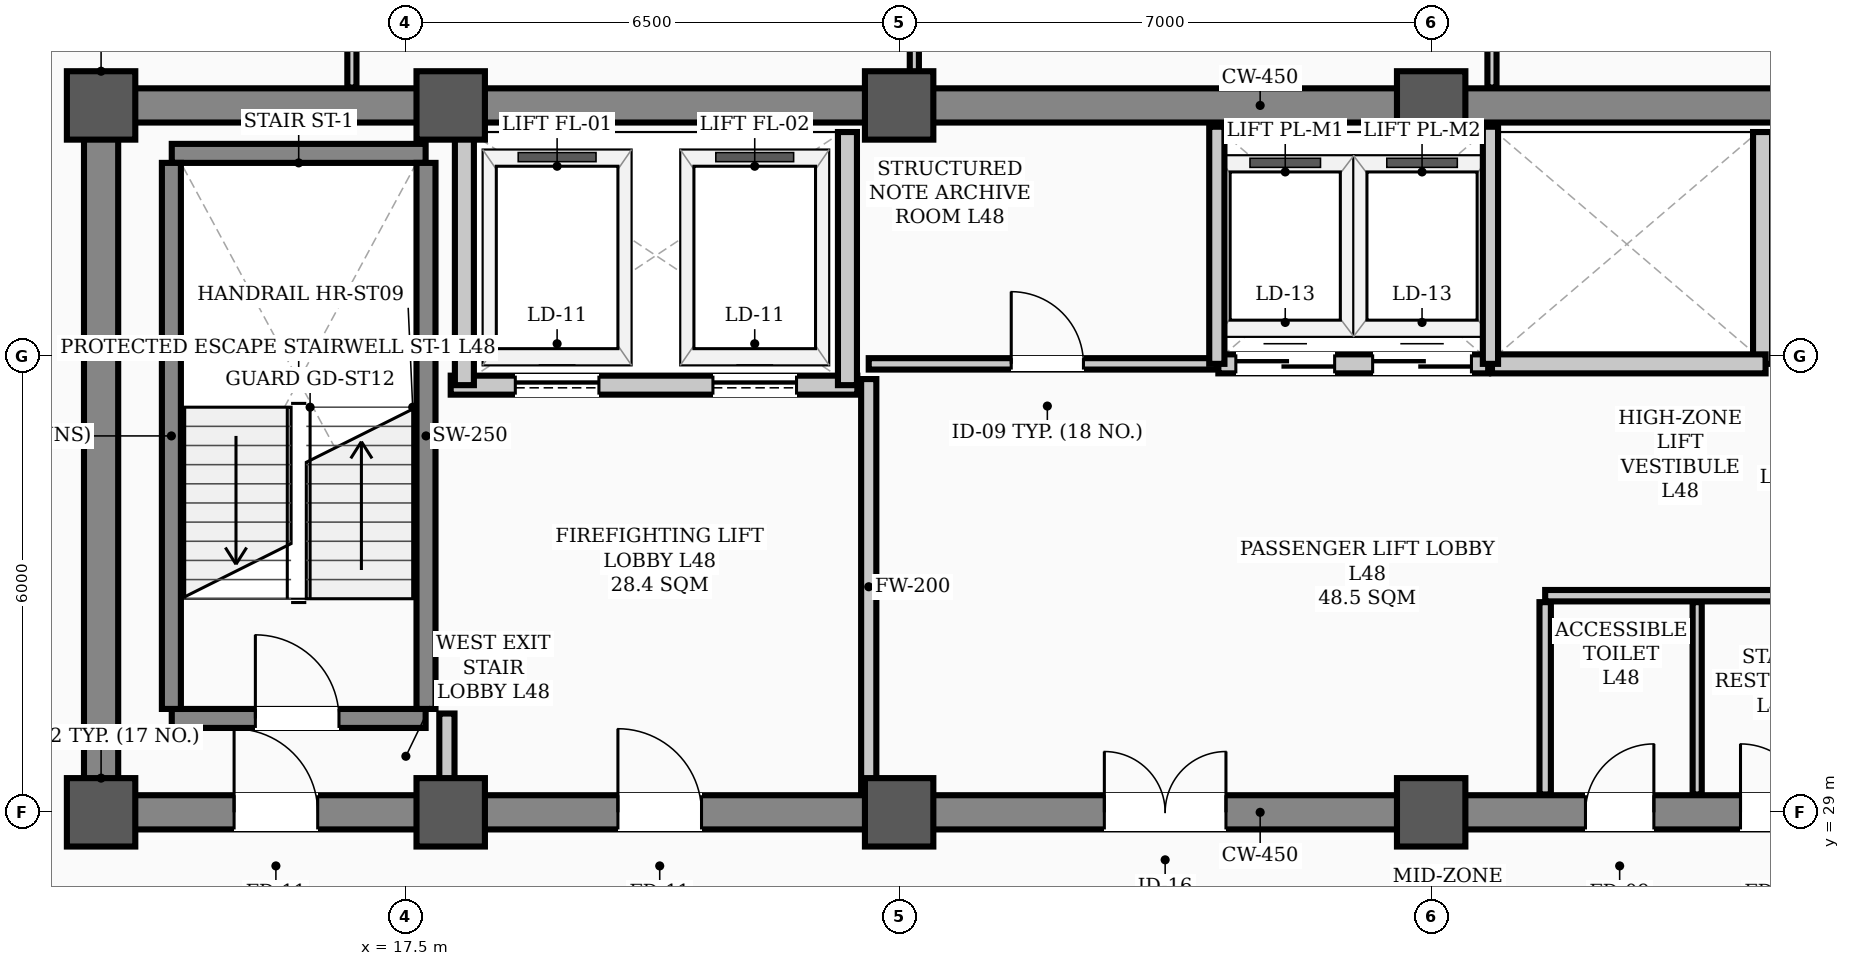
"""IFC4 building model, lengths in metres.
Left out: names, types, materials, properties, quantities, classifications, styles, units other than length and angle.
Written with IfcOpenShell. Run it as: python <this file> out.ifc"""

import sys

from ifc_helpers import new_model, si_unit, direction, frame, frame_2d, origin, origin_2d, place, context, subcontext, project, spatial, rectangle, hollow_rectangle, extrude, element, fill, save


model = new_model("IFC4")
c1 = context("Model", 3, precision=1e-05, world=origin(), true_north=direction((0.0, 1.0)))
c2 = subcontext(c1, "Body", "Model", "MODEL_VIEW")
j1 = project(units=[si_unit("LENGTHUNIT", "METRE"), si_unit("PLANEANGLEUNIT", "RADIAN")], contexts=[c1])
p1 = place(None, origin())
s1 = spatial("IfcSite", under=j1, at=p1, CompositionType="ELEMENT")
p2 = place(p1, origin())
s2 = spatial("IfcBuilding", under=s1, at=p2, CompositionType="ELEMENT")
p3 = place(p2, frame((0.0, 0.0, 192.9)))
s3 = spatial("IfcBuildingStorey", under=s2, at=p3, CompositionType="ELEMENT", Elevation=192.9)
for number, where, z_axis, x_axis in (
    (1, (13.5, 29.0, 0.0), (0.0, 0.0, 1.0), (1.0, 0.0, 0.0)),
    (2, (13.5, 38.3, 0.0), (0.0, 0.0, 1.0), (1.0, 0.0, 0.0)),
    (3, (18.1, 29.0, 0.0), (0.0, 0.0, 1.0), (1.0, 0.0, 0.0)),
    (4, (18.1, 38.3, 0.0), (0.0, 0.0, 1.0), (1.0, 0.0, 0.0)),
    (5, (24.0, 29.0, 0.0), (0.0, 0.0, 1.0), (1.0, 0.0, 0.0)),
    (6, (24.0, 38.3, 0.0), (0.0, 0.0, 1.0), (1.0, 0.0, 0.0)),
    (7, (31.0, 29.0, 0.0), (0.0, 0.0, 1.0), (1.0, 0.0, 0.0)),
    (8, (31.0, 38.3, 0.0), (0.0, 0.0, 1.0), (1.0, 0.0, 0.0)),
):
    element("IfcColumn", number, at=place(p3, frame(where, z_axis=z_axis, x_axis=x_axis)), inside=s3, PredefinedType="COLUMN", context=c2, shape_type="SweptSolid", body=[
        extrude(hollow_rectangle(XDim=0.9, YDim=0.9, WallThickness=0.035, InnerFilletRadius=0.017, OuterFilletRadius=0.052, at=origin_2d()), origin(), (0.0, 0.0, 1.0), 3.9),
    ])
p4 = place(p3, frame((13.5, 29.0, 0.0), z_axis=(0.0, 0.0, 1.0), x_axis=(1.0, 0.0, 0.0)))
e9 = element("IfcWall", 9, at=p4, inside=s3, PredefinedType="SHEAR", context=c2, shape_type="SweptSolid", body=[
    extrude(rectangle(XDim=30.5, YDim=0.45, at=frame_2d((15.25, 0.0))), origin(), (0.0, 0.0, 1.0), 3.66),
])
p5 = place(p4, frame((1.75, 0.0, 0.0)))
e10 = element("IfcOpeningElement", 10, at=p5, cuts=e9, PredefinedType="OPENING", context=c2, shape_type="SweptSolid", body=[
    extrude(rectangle(XDim=1.1, YDim=2.08, at=frame_2d((0.55, 1.04))), frame((0.0, 0.235, 0.0), z_axis=(0.0, -1.0, 0.0), x_axis=(1.0, 0.0, 0.0)), (0.0, 0.0, 1.0), 0.47),
])
p6 = place(p4, frame((26.7, 0.0, 0.0)))
e11 = element("IfcOpeningElement", 11, at=p6, cuts=e9, PredefinedType="OPENING", context=c2, shape_type="SweptSolid", body=[
    extrude(rectangle(XDim=1.1, YDim=2.08, at=frame_2d((0.55, 1.04))), frame((0.0, 0.235, 0.0), z_axis=(0.0, -1.0, 0.0), x_axis=(1.0, 0.0, 0.0)), (0.0, 0.0, 1.0), 0.47),
])
p7 = place(p4, frame((6.8, 0.0, 0.0)))
e12 = element("IfcOpeningElement", 12, at=p7, cuts=e9, PredefinedType="OPENING", context=c2, shape_type="SweptSolid", body=[
    extrude(rectangle(XDim=1.1, YDim=2.08, at=frame_2d((0.55, 1.04))), frame((0.0, 0.235, 0.0), z_axis=(0.0, -1.0, 0.0), x_axis=(1.0, 0.0, 0.0)), (0.0, 0.0, 1.0), 0.47),
])
p8 = place(p4, frame((13.2, 0.0, 0.0)))
e13 = element("IfcOpeningElement", 13, at=p8, cuts=e9, PredefinedType="OPENING", context=c2, shape_type="SweptSolid", body=[
    extrude(rectangle(XDim=1.6, YDim=2.08, at=frame_2d((0.8, 1.04))), frame((0.0, 0.235, 0.0), z_axis=(0.0, -1.0, 0.0), x_axis=(1.0, 0.0, 0.0)), (0.0, 0.0, 1.0), 0.47),
])
p9 = place(p4, frame((19.53, 0.0, 0.0)))
e14 = element("IfcOpeningElement", 14, at=p9, cuts=e9, PredefinedType="OPENING", context=c2, shape_type="SweptSolid", body=[
    extrude(rectangle(XDim=0.9, YDim=2.08, at=frame_2d((0.45, 1.04))), frame((0.0, 0.235, 0.0), z_axis=(0.0, -1.0, 0.0), x_axis=(1.0, 0.0, 0.0)), (0.0, 0.0, 1.0), 0.47),
])
p10 = place(p4, frame((21.57, 0.0, 0.0)))
e15 = element("IfcOpeningElement", 15, at=p10, cuts=e9, PredefinedType="OPENING", context=c2, shape_type="SweptSolid", body=[
    extrude(rectangle(XDim=0.9, YDim=2.08, at=frame_2d((0.45, 1.04))), frame((0.0, 0.235, 0.0), z_axis=(0.0, -1.0, 0.0), x_axis=(1.0, 0.0, 0.0)), (0.0, 0.0, 1.0), 0.47),
])
p11 = place(p3, frame((13.5, 38.3, 0.0), z_axis=(0.0, 0.0, 1.0), x_axis=(1.0, 0.0, 0.0)))
e16 = element("IfcWall", 16, at=p11, inside=s3, PredefinedType="SHEAR", context=c2, shape_type="SweptSolid", body=[
    extrude(rectangle(XDim=30.5, YDim=0.45, at=frame_2d((15.25, 0.0))), origin(), (0.0, 0.0, 1.0), 3.66),
])
p12 = place(p3, frame((13.5, 29.35, 0.0), z_axis=(0.0, 0.0, 1.0), x_axis=(0.0, 1.0, 0.0)))
e17 = element("IfcWall", 17, at=p12, inside=s3, PredefinedType="SHEAR", context=c2, shape_type="SweptSolid", body=[
    extrude(rectangle(XDim=8.6, YDim=0.45, at=frame_2d((4.3, 0.0))), origin(), (0.0, 0.0, 1.0), 3.66),
])
p13 = place(p3, frame((14.43, 30.235, 0.0), z_axis=(0.0, 0.0, 1.0), x_axis=(1.0, 0.0, 0.0)))
e18 = element("IfcWall", 18, at=p13, inside=s3, PredefinedType="STANDARD", context=c2, shape_type="SweptSolid", body=[
    extrude(rectangle(XDim=3.34, YDim=0.25, at=frame_2d((1.67, 0.0))), origin(), (0.0, 0.0, 1.0), 3.66),
])
p14 = place(p13, frame((1.1, 0.0, 0.0)))
e19 = element("IfcOpeningElement", 19, at=p14, cuts=e18, PredefinedType="OPENING", context=c2, shape_type="SweptSolid", body=[
    extrude(rectangle(XDim=1.1, YDim=2.08, at=frame_2d((0.55, 1.04))), frame((0.0, 0.135, 0.0), z_axis=(0.0, -1.0, 0.0), x_axis=(1.0, 0.0, 0.0)), (0.0, 0.0, 1.0), 0.27),
])
p15 = place(p3, frame((14.43, 37.669, 0.0), z_axis=(0.0, 0.0, 1.0), x_axis=(1.0, 0.0, 0.0)))
e20 = element("IfcWall", 20, at=p15, inside=s3, PredefinedType="STANDARD", context=c2, shape_type="SweptSolid", body=[
    extrude(rectangle(XDim=3.34, YDim=0.25, at=frame_2d((1.67, 0.0))), origin(), (0.0, 0.0, 1.0), 3.66),
])
for number, where, z_axis, x_axis in (
    (21, (14.425, 30.36, 0.0), (0.0, 0.0, 1.0), (0.0, 1.0, 0.0)),
    (22, (17.775, 30.36, 0.0), (0.0, 0.0, 1.0), (0.0, 1.0, 0.0)),
):
    element("IfcWall", number, at=place(p3, frame(where, z_axis=z_axis, x_axis=x_axis)), inside=s3, PredefinedType="STANDARD", context=c2, shape_type="SweptSolid", body=[
        extrude(rectangle(XDim=7.184, YDim=0.25, at=frame_2d((3.592, 0.0))), origin(), (0.0, 0.0, 1.0), 3.66),
    ])
p16 = place(p3, frame((18.1, 34.62, 0.0), z_axis=(0.0, 0.0, 1.0), x_axis=(1.0, 0.0, 0.0)))
e23 = element("IfcWall", 23, at=p16, inside=s3, PredefinedType="STANDARD", context=c2, shape_type="SweptSolid", body=[
    extrude(rectangle(XDim=5.35, YDim=0.25, at=frame_2d((2.675, 0.0))), origin(), (0.0, 0.0, 1.0), 3.66),
])
p17 = place(p16, frame((0.85, 0.0, 0.0)))
e24 = element("IfcOpeningElement", 24, at=p17, cuts=e23, PredefinedType="OPENING", context=c2, shape_type="SweptSolid", body=[
    extrude(rectangle(XDim=1.1, YDim=2.08, at=frame_2d((0.55, 1.04))), frame((0.0, 0.135, 0.0), z_axis=(0.0, -1.0, 0.0), x_axis=(1.0, 0.0, 0.0)), (0.0, 0.0, 1.0), 0.27),
])
p18 = place(p16, frame((3.45, 0.0, 0.0)))
e25 = element("IfcOpeningElement", 25, at=p18, cuts=e23, PredefinedType="OPENING", context=c2, shape_type="SweptSolid", body=[
    extrude(rectangle(XDim=1.1, YDim=2.08, at=frame_2d((0.55, 1.04))), frame((0.0, 0.135, 0.0), z_axis=(0.0, -1.0, 0.0), x_axis=(1.0, 0.0, 0.0)), (0.0, 0.0, 1.0), 0.27),
])
for number, where, z_axis, x_axis in (
    (26, (18.28, 34.62, 0.0), (0.0, 0.0, 1.0), (0.0, 1.0, 0.0)),
    (27, (23.32, 34.62, 0.0), (0.0, 0.0, 1.0), (0.0, 1.0, 0.0)),
):
    element("IfcWall", number, at=place(p3, frame(where, z_axis=z_axis, x_axis=x_axis)), inside=s3, PredefinedType="STANDARD", context=c2, shape_type="SweptSolid", body=[
        extrude(rectangle(XDim=3.33, YDim=0.25, at=frame_2d((1.665, 0.0))), origin(), (0.0, 0.0, 1.0), 2.24),
    ])
p19 = place(p3, frame((35.36, 34.9, 0.0), z_axis=(0.0, 0.0, 1.0), x_axis=(0.0, 1.0, 0.0)))
e28 = element("IfcWall", 28, at=p19, inside=s3, PredefinedType="STANDARD", context=c2, shape_type="SweptSolid", body=[
    extrude(rectangle(XDim=3.05, YDim=0.25, at=frame_2d((1.525, 0.0))), origin(), (0.0, 0.0, 1.0), 2.24),
])
p20 = place(p3, frame((28.2, 34.9, 0.0), z_axis=(0.0, 0.0, 1.0), x_axis=(1.0, 0.0, 0.0)))
e29 = element("IfcWall", 29, at=p20, inside=s3, PredefinedType="STANDARD", context=c2, shape_type="SweptSolid", body=[
    extrude(rectangle(XDim=3.55, YDim=0.25, at=frame_2d((1.775, 0.0))), origin(), (0.0, 0.0, 1.0), 3.66),
])
p21 = place(p20, frame((0.23, 0.0, 0.0)))
e30 = element("IfcOpeningElement", 30, at=p21, cuts=e29, PredefinedType="OPENING", context=c2, shape_type="SweptSolid", body=[
    extrude(rectangle(XDim=1.3, YDim=2.08, at=frame_2d((0.65, 1.04))), frame((0.0, 0.135, 0.0), z_axis=(0.0, -1.0, 0.0), x_axis=(1.0, 0.0, 0.0)), (0.0, 0.0, 1.0), 0.27),
])
p22 = place(p20, frame((2.03, 0.0, 0.0)))
e31 = element("IfcOpeningElement", 31, at=p22, cuts=e29, PredefinedType="OPENING", context=c2, shape_type="SweptSolid", body=[
    extrude(rectangle(XDim=1.3, YDim=2.08, at=frame_2d((0.65, 1.04))), frame((0.0, 0.135, 0.0), z_axis=(0.0, -1.0, 0.0), x_axis=(1.0, 0.0, 0.0)), (0.0, 0.0, 1.0), 0.27),
])
p23 = place(p3, frame((31.8, 34.9, 0.0), z_axis=(0.0, 0.0, 1.0), x_axis=(1.0, 0.0, 0.0)))
e32 = element("IfcWall", 32, at=p23, inside=s3, PredefinedType="STANDARD", context=c2, shape_type="SweptSolid", body=[
    extrude(rectangle(XDim=3.6, YDim=0.25, at=frame_2d((1.8, 0.0))), origin(), (0.0, 0.0, 1.0), 3.66),
])
p24 = place(p3, frame((23.6, 34.9, 0.0), z_axis=(0.0, 0.0, 1.0), x_axis=(1.0, 0.0, 0.0)))
e33 = element("IfcWall", 33, at=p24, inside=s3, PredefinedType="PARTITIONING", context=c2, shape_type="SweptSolid", body=[
    extrude(rectangle(XDim=4.58, YDim=0.15, at=frame_2d((2.29, 0.0))), origin(), (0.0, 0.0, 1.0), 3.66),
])
p25 = place(p24, frame((1.875, 0.0, 0.0)))
e34 = element("IfcOpeningElement", 34, at=p25, cuts=e33, PredefinedType="OPENING", context=c2, shape_type="SweptSolid", body=[
    extrude(rectangle(XDim=0.95, YDim=2.08, at=frame_2d((0.475, 1.04))), frame((0.0, 0.085, 0.0), z_axis=(0.0, -1.0, 0.0), x_axis=(1.0, 0.0, 0.0)), (0.0, 0.0, 1.0), 0.17),
])
p26 = place(p3, frame((32.5, 31.85, 0.0), z_axis=(0.0, 0.0, 1.0), x_axis=(1.0, 0.0, 0.0)))
e35 = element("IfcWall", 35, at=p26, inside=s3, PredefinedType="PARTITIONING", context=c2, shape_type="SweptSolid", body=[
    extrude(rectangle(XDim=4.1, YDim=0.15, at=frame_2d((2.05, 0.0))), origin(), (0.0, 0.0, 1.0), 3.66),
])
p27 = place(p3, frame((18.05, 29.235, 0.0), z_axis=(0.0, 0.0, 1.0), x_axis=(0.0, 1.0, 0.0)))
e36 = element("IfcWall", 36, at=p27, inside=s3, PredefinedType="STANDARD", context=c2, shape_type="SweptSolid", body=[
    extrude(rectangle(XDim=1.065, YDim=0.2, at=frame_2d((0.532, 0.0))), origin(), (0.0, 0.0, 1.0), 2.24),
])
p28 = place(p3, frame((23.6, 29.235, 0.0), z_axis=(0.0, 0.0, 1.0), x_axis=(0.0, 1.0, 0.0)))
e37 = element("IfcWall", 37, at=p28, inside=s3, PredefinedType="STANDARD", context=c2, shape_type="SweptSolid", body=[
    extrude(rectangle(XDim=5.465, YDim=0.2, at=frame_2d((2.732, 0.0))), origin(), (0.0, 0.0, 1.0), 2.24),
])
p29 = place(p3, frame((32.5, 29.235, 0.0), z_axis=(0.0, 0.0, 1.0), x_axis=(0.0, 1.0, 0.0)))
e38 = element("IfcWall", 38, at=p29, inside=s3, PredefinedType="PARTITIONING", context=c2, shape_type="SweptSolid", body=[
    extrude(rectangle(XDim=2.53, YDim=0.15, at=frame_2d((1.265, 0.0))), origin(), (0.0, 0.0, 1.0), 2.24),
])
p30 = place(p3, frame((34.5, 29.235, 0.0), z_axis=(0.0, 0.0, 1.0), x_axis=(0.0, 1.0, 0.0)))
e39 = element("IfcWall", 39, at=p30, inside=s3, PredefinedType="PARTITIONING", context=c2, shape_type="SweptSolid", body=[
    extrude(rectangle(XDim=2.53, YDim=0.12, at=frame_2d((1.265, 0.0))), origin(), (0.0, 0.0, 1.0), 2.24),
])
p31 = place(p3, frame((16.8, 38.535, 0.0), z_axis=(0.0, 0.0, 1.0), x_axis=(0.0, 1.0, 0.0)))
e40 = element("IfcWall", 40, at=p31, inside=s3, PredefinedType="PARTITIONING", context=c2, shape_type="SweptSolid", body=[
    extrude(rectangle(XDim=6.405, YDim=0.12, at=frame_2d((3.203, 0.0))), origin(), (0.0, 0.0, 1.0), 2.24),
])
p32 = place(p31, frame((3.485, 0.0, 0.0)))
e41 = element("IfcOpeningElement", 41, at=p32, cuts=e40, PredefinedType="OPENING", context=c2, shape_type="SweptSolid", body=[
    extrude(rectangle(XDim=0.95, YDim=2.08, at=frame_2d((0.475, 1.04))), frame((0.0, 0.07, 0.0), z_axis=(0.0, -1.0, 0.0), x_axis=(1.0, 0.0, 0.0)), (0.0, 0.0, 1.0), 0.14),
])
p33 = place(p3, frame((24.2, 38.535, 0.0), z_axis=(0.0, 0.0, 1.0), x_axis=(0.0, 1.0, 0.0)))
e42 = element("IfcWall", 42, at=p33, inside=s3, PredefinedType="PARTITIONING", context=c2, shape_type="SweptSolid", body=[
    extrude(rectangle(XDim=6.405, YDim=0.12, at=frame_2d((3.203, 0.0))), origin(), (0.0, 0.0, 1.0), 2.24),
])
p34 = place(p33, frame((3.485, 0.0, 0.0)))
e43 = element("IfcOpeningElement", 43, at=p34, cuts=e42, PredefinedType="OPENING", context=c2, shape_type="SweptSolid", body=[
    extrude(rectangle(XDim=0.95, YDim=2.08, at=frame_2d((0.475, 1.04))), frame((0.0, 0.07, 0.0), z_axis=(0.0, -1.0, 0.0), x_axis=(1.0, 0.0, 0.0)), (0.0, 0.0, 1.0), 0.14),
])
p35 = place(p3, frame((31.8, 38.535, 0.0), z_axis=(0.0, 0.0, 1.0), x_axis=(0.0, 1.0, 0.0)))
e44 = element("IfcWall", 44, at=p35, inside=s3, PredefinedType="PARTITIONING", context=c2, shape_type="SweptSolid", body=[
    extrude(rectangle(XDim=6.405, YDim=0.12, at=frame_2d((3.203, 0.0))), origin(), (0.0, 0.0, 1.0), 2.24),
])
p36 = place(p35, frame((3.485, 0.0, 0.0)))
e45 = element("IfcOpeningElement", 45, at=p36, cuts=e44, PredefinedType="OPENING", context=c2, shape_type="SweptSolid", body=[
    extrude(rectangle(XDim=0.95, YDim=2.08, at=frame_2d((0.475, 1.04))), frame((0.0, 0.07, 0.0), z_axis=(0.0, -1.0, 0.0), x_axis=(1.0, 0.0, 0.0)), (0.0, 0.0, 1.0), 0.14),
])
for number, where, z_axis, x_axis in (
    (46, (28.18, 34.9, 0.0), (0.0, 0.0, 1.0), (0.0, 1.0, 0.0)),
    (47, (31.78, 34.9, 0.0), (0.0, 0.0, 1.0), (0.0, 1.0, 0.0)),
):
    element("IfcWall", number, at=place(p3, frame(where, z_axis=z_axis, x_axis=x_axis)), inside=s3, PredefinedType="STANDARD", context=c2, shape_type="SweptSolid", body=[
        extrude(rectangle(XDim=3.12, YDim=0.2, at=frame_2d((1.56, 0.0))), origin(), (0.0, 0.0, 1.0), 2.24),
    ])
p37 = place(p14, origin())
e48 = element("IfcDoor", 48, at=p37, inside=s3, OperationType="SINGLE_SWING_LEFT", PredefinedType="DOOR", context=c2, shape_type="SweptSolid", body=[
    extrude(rectangle(XDim=1.1, YDim=2.08, at=frame_2d((0.55, 1.04))), frame((0.0, 0.025, 0.0), z_axis=(0.0, -1.0, 0.0), x_axis=(1.0, 0.0, 0.0)), (0.0, 0.0, 1.0), 0.05),
])
fill(e19, e48)
p38 = place(p5, origin())
e49 = element("IfcDoor", 49, at=p38, inside=s3, OperationType="SINGLE_SWING_LEFT", PredefinedType="DOOR", context=c2, shape_type="SweptSolid", body=[
    extrude(rectangle(XDim=1.1, YDim=2.08, at=frame_2d((0.55, 1.04))), frame((0.0, 0.025, 0.0), z_axis=(0.0, -1.0, 0.0), x_axis=(1.0, 0.0, 0.0)), (0.0, 0.0, 1.0), 0.05),
])
fill(e10, e49)
p39 = place(p7, origin())
e50 = element("IfcDoor", 50, at=p39, inside=s3, OperationType="SINGLE_SWING_LEFT", PredefinedType="DOOR", context=c2, shape_type="SweptSolid", body=[
    extrude(rectangle(XDim=1.1, YDim=2.08, at=frame_2d((0.55, 1.04))), frame((0.0, 0.025, 0.0), z_axis=(0.0, -1.0, 0.0), x_axis=(1.0, 0.0, 0.0)), (0.0, 0.0, 1.0), 0.05),
])
fill(e12, e50)
p40 = place(p8, origin())
e51 = element("IfcDoor", 51, at=p40, inside=s3, OperationType="DOUBLE_DOOR_SINGLE_SWING", PredefinedType="DOOR", context=c2, shape_type="SweptSolid", body=[
    extrude(rectangle(XDim=1.6, YDim=2.08, at=frame_2d((0.8, 1.04))), frame((0.0, 0.025, 0.0), z_axis=(0.0, -1.0, 0.0), x_axis=(1.0, 0.0, 0.0)), (0.0, 0.0, 1.0), 0.05),
])
fill(e13, e51)
p41 = place(p25, origin())
e52 = element("IfcDoor", 52, at=p41, inside=s3, OperationType="SINGLE_SWING_LEFT", PredefinedType="DOOR", context=c2, shape_type="SweptSolid", body=[
    extrude(rectangle(XDim=0.95, YDim=2.08, at=frame_2d((0.475, 1.04))), frame((0.0, 0.025, 0.0), z_axis=(0.0, -1.0, 0.0), x_axis=(1.0, 0.0, 0.0)), (0.0, 0.0, 1.0), 0.05),
])
fill(e34, e52)
p42 = place(p9, origin())
e53 = element("IfcDoor", 53, at=p42, inside=s3, OperationType="SINGLE_SWING_RIGHT", PredefinedType="DOOR", context=c2, shape_type="SweptSolid", body=[
    extrude(rectangle(XDim=0.9, YDim=2.08, at=frame_2d((0.45, 1.04))), frame((0.0, 0.025, 0.0), z_axis=(0.0, -1.0, 0.0), x_axis=(1.0, 0.0, 0.0)), (0.0, 0.0, 1.0), 0.05),
])
fill(e14, e53)
p43 = place(p10, origin())
e54 = element("IfcDoor", 54, at=p43, inside=s3, OperationType="SINGLE_SWING_LEFT", PredefinedType="DOOR", context=c2, shape_type="SweptSolid", body=[
    extrude(rectangle(XDim=0.9, YDim=2.08, at=frame_2d((0.45, 1.04))), frame((0.0, 0.025, 0.0), z_axis=(0.0, -1.0, 0.0), x_axis=(1.0, 0.0, 0.0)), (0.0, 0.0, 1.0), 0.05),
])
fill(e15, e54)
p44 = place(p17, origin())
e55 = element("IfcDoor", 55, at=p44, inside=s3, OperationType="SLIDING_TO_LEFT", PredefinedType="DOOR", context=c2, shape_type="SweptSolid", body=[
    extrude(rectangle(XDim=1.1, YDim=2.08, at=frame_2d((0.55, 1.04))), frame((0.0, 0.025, 0.0), z_axis=(0.0, -1.0, 0.0), x_axis=(1.0, 0.0, 0.0)), (0.0, 0.0, 1.0), 0.05),
])
fill(e24, e55)
p45 = place(p18, origin())
e56 = element("IfcDoor", 56, at=p45, inside=s3, OperationType="SLIDING_TO_LEFT", PredefinedType="DOOR", context=c2, shape_type="SweptSolid", body=[
    extrude(rectangle(XDim=1.1, YDim=2.08, at=frame_2d((0.55, 1.04))), frame((0.0, 0.025, 0.0), z_axis=(0.0, -1.0, 0.0), x_axis=(1.0, 0.0, 0.0)), (0.0, 0.0, 1.0), 0.05),
])
fill(e25, e56)
p46 = place(p21, origin())
e57 = element("IfcDoor", 57, at=p46, inside=s3, OperationType="DOUBLE_DOOR_SLIDING", PredefinedType="DOOR", context=c2, shape_type="SweptSolid", body=[
    extrude(rectangle(XDim=1.3, YDim=2.08, at=frame_2d((0.65, 1.04))), frame((0.0, 0.025, 0.0), z_axis=(0.0, -1.0, 0.0), x_axis=(1.0, 0.0, 0.0)), (0.0, 0.0, 1.0), 0.05),
])
fill(e30, e57)
p47 = place(p22, origin())
e58 = element("IfcDoor", 58, at=p47, inside=s3, OperationType="DOUBLE_DOOR_SLIDING", PredefinedType="DOOR", context=c2, shape_type="SweptSolid", body=[
    extrude(rectangle(XDim=1.3, YDim=2.08, at=frame_2d((0.65, 1.04))), frame((0.0, 0.025, 0.0), z_axis=(0.0, -1.0, 0.0), x_axis=(1.0, 0.0, 0.0)), (0.0, 0.0, 1.0), 0.05),
])
fill(e31, e58)
save(model, sys.argv[1])
